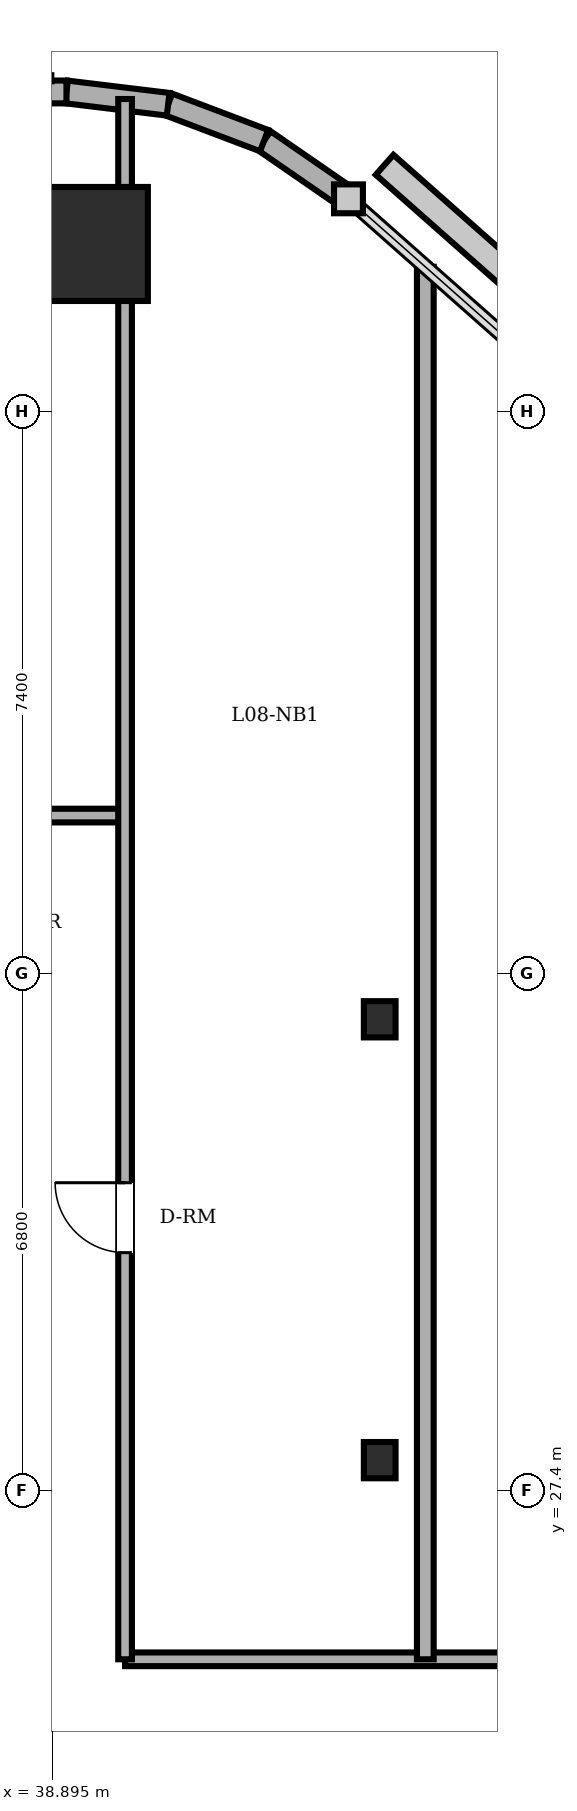
"""IFC4 building model, lengths in metres.
Left out: names, types, materials, properties, quantities, classifications, styles, units other than length and angle.
Written with IfcOpenShell. Run it as: python <this file> out.ifc"""

import sys

from ifc_helpers import new_model, si_unit, direction, frame, frame_2d, origin, origin_2d, place, context, subcontext, project, spatial, rectangle, circle, i_section, extrude, element, fill, save


model = new_model("IFC4")
c1 = context("Model", 3, precision=1e-05, world=origin(), true_north=direction((0.0, 1.0)))
c2 = subcontext(c1, "Body", "Model", "MODEL_VIEW")
j1 = project(units=[si_unit("LENGTHUNIT", "METRE"), si_unit("PLANEANGLEUNIT", "RADIAN")], contexts=[c1])
p1 = place(None, origin())
s1 = spatial("IfcSite", under=j1, at=p1, CompositionType="ELEMENT")
p2 = place(p1, origin())
s2 = spatial("IfcBuilding", under=s1, at=p2, CompositionType="ELEMENT")
p3 = place(p2, frame((0.0, 0.0, 32.4)))
s3 = spatial("IfcBuildingStorey", under=s2, at=p3, CompositionType="ELEMENT", Elevation=32.4)
p4 = place(p3, frame((39.4, 43.8, 0.0), z_axis=(0.0, 0.0, 1.0), x_axis=(1.0, 0.0, 0.0)))
e1 = element("IfcColumn", 1, at=p4, inside=s3, PredefinedType="COLUMN", context=c2, shape_type="SweptSolid", body=[
    extrude(circle(Radius=0.75, at=origin_2d()), origin(), (0.0, 0.0, 1.0), 3.6),
])
for number, where, z_axis, x_axis in (
    (2, (43.2, 27.8, 0.0), (0.0, 0.0, 1.0), (1.0, 0.0, 0.0)),
    (3, (43.2, 33.6, 0.0), (0.0, 0.0, 1.0), (1.0, 0.0, 0.0)),
):
    element("IfcColumn", number, at=place(p3, frame(where, z_axis=z_axis, x_axis=x_axis)), inside=s3, PredefinedType="COLUMN", context=c2, shape_type="SweptSolid", body=[
        extrude(i_section(OverallWidth=0.417, OverallDepth=0.477, WebThickness=0.036, FlangeThickness=0.057, FilletRadius=0.015, at=origin_2d()), origin(), (0.0, 0.0, 1.0), 3.6),
    ])
p5 = place(p3, frame((42.789, 44.394, 0.0), z_axis=(0.0, 0.0, 1.0), x_axis=(-0.823116500192, 0.567872544777, 0.0)))
e4 = element("IfcWall", 4, at=p5, inside=s3, PredefinedType="SOLIDWALL", context=c2, shape_type="SweptSolid", body=[
    extrude(rectangle(XDim=1.349, YDim=0.3, at=frame_2d((0.674, 0.0))), origin(), (0.0, 0.0, 1.0), 3.4),
])
p6 = place(p3, frame((41.679, 45.16, 0.0), z_axis=(0.0, 0.0, 1.0), x_axis=(-0.935156721165, 0.354234254216, 0.0)))
e5 = element("IfcWall", 5, at=p6, inside=s3, PredefinedType="SOLIDWALL", context=c2, shape_type="SweptSolid", body=[
    extrude(rectangle(XDim=1.349, YDim=0.3, at=frame_2d((0.675, 0.0))), origin(), (0.0, 0.0, 1.0), 3.4),
])
p7 = place(p3, frame((40.417, 45.638, 0.0), z_axis=(0.0, 0.0, 1.0), x_axis=(-0.992739027259, 0.120288086515, 0.0)))
e6 = element("IfcWall", 6, at=p7, inside=s3, PredefinedType="SOLIDWALL", context=c2, shape_type="SweptSolid", body=[
    extrude(rectangle(XDim=1.348, YDim=0.3, at=frame_2d((0.674, 0.0))), origin(), (0.0, 0.0, 1.0), 3.4),
])
p8 = place(p3, frame((39.079, 45.8, 0.0), z_axis=(0.0, 0.0, 1.0), x_axis=(-1.0, 0.0, 0.0)))
e7 = element("IfcWall", 7, at=p8, inside=s3, PredefinedType="SOLIDWALL", context=c2, shape_type="SweptSolid", body=[
    extrude(rectangle(XDim=30.079, YDim=0.3, at=frame_2d((15.04, 0.0))), origin(), (0.0, 0.0, 1.0), 3.4),
])
p9 = place(p8, frame((25.279, 0.0, 0.0)))
e8 = element("IfcOpeningElement", 8, at=p9, cuts=e7, PredefinedType="OPENING", context=c2, shape_type="SweptSolid", body=[
    extrude(rectangle(XDim=0.95, YDim=2.2, at=frame_2d((0.475, 1.1))), frame((0.0, 0.16, 0.0), z_axis=(0.0, -1.0, 0.0), x_axis=(1.0, 0.0, 0.0)), (0.0, 0.0, 1.0), 0.32),
])
p10 = place(p8, frame((2.226, 0.0, 0.85)))
e9 = element("IfcOpeningElement", 9, at=p10, cuts=e7, PredefinedType="OPENING", context=c2, shape_type="SweptSolid", body=[
    extrude(rectangle(XDim=1.8, YDim=1.55, at=frame_2d((0.9, 0.775))), frame((0.0, 0.16, 0.0), z_axis=(0.0, -1.0, 0.0), x_axis=(1.0, 0.0, 0.0)), (0.0, 0.0, 1.0), 0.32),
])
p11 = place(p8, frame((5.003, 0.0, 0.85)))
e10 = element("IfcOpeningElement", 10, at=p11, cuts=e7, PredefinedType="OPENING", context=c2, shape_type="SweptSolid", body=[
    extrude(rectangle(XDim=1.8, YDim=1.55, at=frame_2d((0.9, 0.775))), frame((0.0, 0.16, 0.0), z_axis=(0.0, -1.0, 0.0), x_axis=(1.0, 0.0, 0.0)), (0.0, 0.0, 1.0), 0.32),
])
p12 = place(p8, frame((10.179, 0.0, 0.85)))
e11 = element("IfcOpeningElement", 11, at=p12, cuts=e7, PredefinedType="OPENING", context=c2, shape_type="SweptSolid", body=[
    extrude(rectangle(XDim=1.8, YDim=1.55, at=frame_2d((0.9, 0.775))), frame((0.0, 0.16, 0.0), z_axis=(0.0, -1.0, 0.0), x_axis=(1.0, 0.0, 0.0)), (0.0, 0.0, 1.0), 0.32),
])
p13 = place(p8, frame((12.579, 0.0, 0.85)))
e12 = element("IfcOpeningElement", 12, at=p13, cuts=e7, PredefinedType="OPENING", context=c2, shape_type="SweptSolid", body=[
    extrude(rectangle(XDim=1.8, YDim=1.55, at=frame_2d((0.9, 0.775))), frame((0.0, 0.16, 0.0), z_axis=(0.0, -1.0, 0.0), x_axis=(1.0, 0.0, 0.0)), (0.0, 0.0, 1.0), 0.32),
])
p14 = place(p8, frame((19.007, 0.0, 0.85)))
e13 = element("IfcOpeningElement", 13, at=p14, cuts=e7, PredefinedType="OPENING", context=c2, shape_type="SweptSolid", body=[
    extrude(rectangle(XDim=1.8, YDim=1.55, at=frame_2d((0.9, 0.775))), frame((0.0, 0.16, 0.0), z_axis=(0.0, -1.0, 0.0), x_axis=(1.0, 0.0, 0.0)), (0.0, 0.0, 1.0), 0.32),
])
p15 = place(p8, frame((23.034, 0.0, 0.85)))
e14 = element("IfcOpeningElement", 14, at=p15, cuts=e7, PredefinedType="OPENING", context=c2, shape_type="SweptSolid", body=[
    extrude(rectangle(XDim=1.8, YDim=1.55, at=frame_2d((0.9, 0.775))), frame((0.0, 0.16, 0.0), z_axis=(0.0, -1.0, 0.0), x_axis=(1.0, 0.0, 0.0)), (0.0, 0.0, 1.0), 0.32),
])
p16 = place(p3, frame((39.85, 25.18, 0.0), z_axis=(0.0, 0.0, 1.0), x_axis=(1.0, 0.0, 0.0)))
e15 = element("IfcWall", 15, at=p16, inside=s3, PredefinedType="PARTITIONING", context=c2, shape_type="SweptSolid", body=[
    extrude(rectangle(XDim=11.75, YDim=0.18, at=frame_2d((5.875, 0.0))), origin(), (0.0, 0.0, 1.0), 3.4),
])
p17 = place(p16, frame((4.95, 0.0, 0.0)))
e16 = element("IfcOpeningElement", 16, at=p17, cuts=e15, PredefinedType="OPENING", context=c2, shape_type="SweptSolid", body=[
    extrude(rectangle(XDim=1.0, YDim=2.15, at=frame_2d((0.5, 1.075))), frame((0.0, 0.1, 0.0), z_axis=(0.0, -1.0, 0.0), x_axis=(1.0, 0.0, 0.0)), (0.0, 0.0, 1.0), 0.2),
])
p18 = place(p3, frame((3.4, 36.28, 0.0), z_axis=(0.0, 0.0, 1.0), x_axis=(1.0, 0.0, 0.0)))
e17 = element("IfcWall", 17, at=p18, inside=s3, PredefinedType="PARTITIONING", context=c2, shape_type="SweptSolid", body=[
    extrude(rectangle(XDim=36.45, YDim=0.18, at=frame_2d((18.225, 0.0))), origin(), (0.0, 0.0, 1.0), 3.4),
])
p19 = place(p18, frame((21.05, 0.0, 0.0)))
e18 = element("IfcOpeningElement", 18, at=p19, cuts=e17, PredefinedType="OPENING", context=c2, shape_type="SweptSolid", body=[
    extrude(rectangle(XDim=0.9, YDim=2.1, at=frame_2d((0.45, 1.05))), frame((0.0, 0.1, 0.0), z_axis=(0.0, -1.0, 0.0), x_axis=(1.0, 0.0, 0.0)), (0.0, 0.0, 1.0), 0.2),
])
p20 = place(p18, frame((24.67, 0.0, 0.0)))
e19 = element("IfcOpeningElement", 19, at=p20, cuts=e17, PredefinedType="OPENING", context=c2, shape_type="SweptSolid", body=[
    extrude(rectangle(XDim=0.86, YDim=2.1, at=frame_2d((0.43, 1.05))), frame((0.0, 0.1, 0.0), z_axis=(0.0, -1.0, 0.0), x_axis=(1.0, 0.0, 0.0)), (0.0, 0.0, 1.0), 0.2),
])
p21 = place(p18, frame((4.659, 0.0, 0.0)))
e20 = element("IfcOpeningElement", 20, at=p21, cuts=e17, PredefinedType="OPENING", context=c2, shape_type="SweptSolid", body=[
    extrude(rectangle(XDim=1.0, YDim=2.15, at=frame_2d((0.5, 1.075))), frame((0.0, 0.1, 0.0), z_axis=(0.0, -1.0, 0.0), x_axis=(1.0, 0.0, 0.0)), (0.0, 0.0, 1.0), 0.2),
])
p22 = place(p18, frame((13.258, 0.0, 0.0)))
e21 = element("IfcOpeningElement", 21, at=p22, cuts=e17, PredefinedType="OPENING", context=c2, shape_type="SweptSolid", body=[
    extrude(rectangle(XDim=1.0, YDim=2.15, at=frame_2d((0.5, 1.075))), frame((0.0, 0.1, 0.0), z_axis=(0.0, -1.0, 0.0), x_axis=(1.0, 0.0, 0.0)), (0.0, 0.0, 1.0), 0.2),
])
p23 = place(p18, frame((30.965, 0.0, 0.0)))
e22 = element("IfcOpeningElement", 22, at=p23, cuts=e17, PredefinedType="OPENING", context=c2, shape_type="SweptSolid", body=[
    extrude(rectangle(XDim=1.0, YDim=2.15, at=frame_2d((0.5, 1.075))), frame((0.0, 0.1, 0.0), z_axis=(0.0, -1.0, 0.0), x_axis=(1.0, 0.0, 0.0)), (0.0, 0.0, 1.0), 0.2),
])
p24 = place(p3, frame((39.85, 25.18, 0.0), z_axis=(0.0, 0.0, 1.0), x_axis=(0.0, 1.0, 0.0)))
e23 = element("IfcWall", 23, at=p24, inside=s3, PredefinedType="PARTITIONING", context=c2, shape_type="SweptSolid", body=[
    extrude(rectangle(XDim=20.527, YDim=0.18, at=frame_2d((10.264, 0.0))), origin(), (0.0, 0.0, 1.0), 2.782),
])
p25 = place(p24, frame((5.35, 0.0, 0.0)))
e24 = element("IfcOpeningElement", 24, at=p25, cuts=e23, PredefinedType="OPENING", context=c2, shape_type="SweptSolid", body=[
    extrude(rectangle(XDim=0.92, YDim=2.1, at=frame_2d((0.46, 1.05))), frame((0.0, 0.1, 0.0), z_axis=(0.0, -1.0, 0.0), x_axis=(1.0, 0.0, 0.0)), (0.0, 0.0, 1.0), 0.2),
])
p26 = place(p3, frame((43.8, 25.18, 0.0), z_axis=(0.0, 0.0, 1.0), x_axis=(0.0, 1.0, 0.0)))
e25 = element("IfcWall", 25, at=p26, inside=s3, PredefinedType="PARTITIONING", context=c2, shape_type="SweptSolid", body=[
    extrude(rectangle(XDim=18.32, YDim=0.22, at=frame_2d((9.16, 0.0))), origin(), (0.0, 0.0, 1.0), 3.4),
])
p27 = place(p25, origin())
e26 = element("IfcDoor", 26, at=p27, inside=s3, OperationType="SINGLE_SWING_RIGHT", PredefinedType="DOOR", context=c2, shape_type="SweptSolid", body=[
    extrude(rectangle(XDim=0.92, YDim=2.1, at=frame_2d((0.46, 1.05))), frame((0.0, 0.025, 0.0), z_axis=(0.0, -1.0, 0.0), x_axis=(1.0, 0.0, 0.0)), (0.0, 0.0, 1.0), 0.05),
])
fill(e24, e26)
save(model, sys.argv[1])
